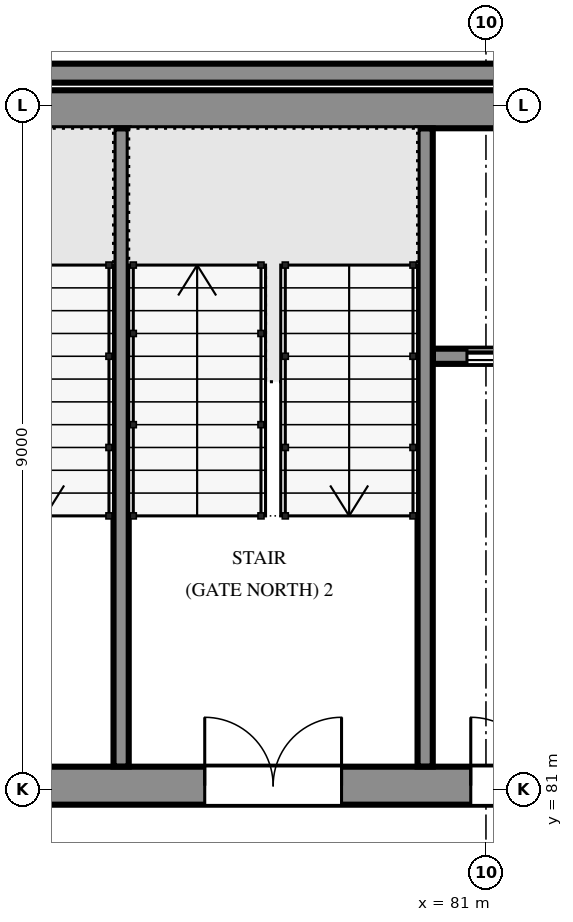
"""IFC4 building model, lengths in metres.
Left out: names, types, materials, properties, quantities, classifications, styles, units other than length and angle.
Written with IfcOpenShell. Run it as: python <this file> out.ifc"""

import sys

from ifc_helpers import new_model, si_unit, direction, frame, frame_2d, origin, place, context, subcontext, project, spatial, polyline, rectangle, outline, extrude, element, fill, save


model = new_model("IFC4")
c1 = context("Model", 3, precision=1e-05, world=origin(), true_north=direction((0.0, 1.0)))
c2 = subcontext(c1, "Body", "Model", "MODEL_VIEW")
j1 = project(units=[si_unit("LENGTHUNIT", "METRE"), si_unit("PLANEANGLEUNIT", "RADIAN")], contexts=[c1])
p1 = place(None, origin())
s1 = spatial("IfcSite", under=j1, at=p1, CompositionType="ELEMENT")
p2 = place(p1, origin())
s2 = spatial("IfcBuilding", under=s1, at=p2, CompositionType="ELEMENT")
p3 = place(p2, frame((0.0, 0.0, 11.7)))
s3 = spatial("IfcBuildingStorey", under=s2, at=p3, CompositionType="ELEMENT", Elevation=11.7)
p4 = place(p3, frame((71.8, 81.05, 0.0), z_axis=(0.0, 0.0, 1.0), x_axis=(1.0, 0.0, 0.0)))
e1 = element("IfcWall", 1, at=p4, inside=s3, PredefinedType="SOLIDWALL", context=c2, shape_type="SweptSolid", body=[
    extrude(rectangle(XDim=18.4, YDim=0.5, at=frame_2d((9.2, 0.0))), origin(), (0.0, 0.0, 1.0), 4.2),
])
p5 = place(p4, frame((1.5, 0.0, 0.0)))
e2 = element("IfcOpeningElement", 2, at=p5, cuts=e1, PredefinedType="OPENING", context=c2, shape_type="SweptSolid", body=[
    extrude(rectangle(XDim=1.8, YDim=2.1, at=frame_2d((0.9, 1.05))), frame((0.0, 0.26, 0.0), z_axis=(0.0, -1.0, 0.0), x_axis=(1.0, 0.0, 0.0)), (0.0, 0.0, 1.0), 0.52),
])
p6 = place(p4, frame((5.5, 0.0, 0.0)))
e3 = element("IfcOpeningElement", 3, at=p6, cuts=e1, PredefinedType="OPENING", context=c2, shape_type="SweptSolid", body=[
    extrude(rectangle(XDim=1.8, YDim=2.1, at=frame_2d((0.9, 1.05))), frame((0.0, 0.26, 0.0), z_axis=(0.0, -1.0, 0.0), x_axis=(1.0, 0.0, 0.0)), (0.0, 0.0, 1.0), 0.52),
])
p7 = place(p4, frame((9.0, 0.0, 0.0)))
e4 = element("IfcOpeningElement", 4, at=p7, cuts=e1, PredefinedType="OPENING", context=c2, shape_type="SweptSolid", body=[
    extrude(rectangle(XDim=1.8, YDim=2.1, at=frame_2d((0.9, 1.05))), frame((0.0, 0.26, 0.0), z_axis=(0.0, -1.0, 0.0), x_axis=(1.0, 0.0, 0.0)), (0.0, 0.0, 1.0), 0.52),
])
p8 = place(p4, frame((16.15, 0.0, 0.0)))
e5 = element("IfcOpeningElement", 5, at=p8, cuts=e1, PredefinedType="OPENING", context=c2, shape_type="SweptSolid", body=[
    extrude(rectangle(XDim=0.9, YDim=2.1, at=frame_2d((0.45, 1.05))), frame((0.0, 0.26, 0.0), z_axis=(0.0, -1.0, 0.0), x_axis=(1.0, 0.0, 0.0)), (0.0, 0.0, 1.0), 0.52),
])
p9 = place(p3, frame((71.8, 89.95, 0.0), z_axis=(0.0, 0.0, 1.0), x_axis=(1.0, 0.0, 0.0)))
e6 = element("IfcWall", 6, at=p9, inside=s3, PredefinedType="SOLIDWALL", context=c2, shape_type="SweptSolid", body=[
    extrude(rectangle(XDim=18.4, YDim=0.5, at=frame_2d((9.2, 0.0))), origin(), (0.0, 0.0, 1.0), 4.2),
])
p10 = place(p3, frame((71.45, 90.425, 0.0), z_axis=(0.0, 0.0, 1.0), x_axis=(1.0, 0.0, 0.0)))
e7 = element("IfcWall", 7, at=p10, inside=s3, PredefinedType="SOLIDWALL", context=c2, shape_type="SweptSolid", body=[
    extrude(outline(polyline([(0.0, 0.0), (19.1, 0.0), (19.1, 12.6), (0.0, 12.6), (0.0, 0.0)]), holes=[polyline([(1.308, 2.439), (1.352, 2.546), (1.408, 2.646), (1.475, 2.74), (1.552, 2.826), (1.638, 2.903), (1.732, 2.969), (1.833, 3.025), (1.939, 3.068), (2.05, 3.1), (2.161, 3.068), (2.267, 3.025), (2.368, 2.969), (2.462, 2.903), (2.549, 2.826), (2.625, 2.74), (2.692, 2.646), (2.748, 2.546), (2.792, 2.439), (2.824, 2.329), (2.844, 2.215), (2.85, 2.1), (2.85, 0.6), (1.25, 0.6), (1.25, 2.1), (1.257, 2.215), (1.276, 2.329), (1.308, 2.439)]), polyline([(4.308, 2.439), (4.352, 2.546), (4.408, 2.646), (4.475, 2.74), (4.552, 2.826), (4.638, 2.903), (4.732, 2.969), (4.833, 3.025), (4.939, 3.068), (5.05, 3.1), (5.161, 3.068), (5.267, 3.025), (5.368, 2.969), (5.462, 2.903), (5.549, 2.826), (5.625, 2.74), (5.692, 2.646), (5.748, 2.546), (5.792, 2.439), (5.824, 2.329), (5.844, 2.215), (5.85, 2.1), (5.85, 0.6), (4.25, 0.6), (4.25, 2.1), (4.257, 2.215), (4.276, 2.329), (4.308, 2.439)]), polyline([(7.308, 2.439), (7.352, 2.546), (7.408, 2.646), (7.475, 2.74), (7.552, 2.826), (7.638, 2.903), (7.732, 2.969), (7.833, 3.025), (7.939, 3.068), (8.05, 3.1), (8.161, 3.068), (8.267, 3.025), (8.368, 2.969), (8.462, 2.903), (8.549, 2.826), (8.625, 2.74), (8.692, 2.646), (8.748, 2.546), (8.792, 2.439), (8.824, 2.329), (8.844, 2.215), (8.85, 2.1), (8.85, 0.6), (7.25, 0.6), (7.25, 2.1), (7.257, 2.215), (7.276, 2.329), (7.308, 2.439)]), polyline([(1.308, 6.639), (1.352, 6.746), (1.408, 6.846), (1.475, 6.94), (1.552, 7.026), (1.638, 7.103), (1.732, 7.169), (1.833, 7.225), (1.939, 7.269), (2.05, 7.3), (2.161, 7.269), (2.267, 7.225), (2.368, 7.169), (2.462, 7.103), (2.549, 7.026), (2.625, 6.94), (2.692, 6.846), (2.748, 6.746), (2.792, 6.639), (2.824, 6.529), (2.844, 6.415), (2.85, 6.3), (2.85, 4.8), (1.25, 4.8), (1.25, 6.3), (1.257, 6.415), (1.276, 6.529), (1.308, 6.639)]), polyline([(4.308, 6.639), (4.352, 6.746), (4.408, 6.846), (4.475, 6.94), (4.552, 7.026), (4.638, 7.103), (4.732, 7.169), (4.833, 7.225), (4.939, 7.269), (5.05, 7.3), (5.161, 7.269), (5.267, 7.225), (5.368, 7.169), (5.462, 7.103), (5.549, 7.026), (5.625, 6.94), (5.692, 6.846), (5.748, 6.746), (5.792, 6.639), (5.824, 6.529), (5.844, 6.415), (5.85, 6.3), (5.85, 4.8), (4.25, 4.8), (4.25, 6.3), (4.257, 6.415), (4.276, 6.529), (4.308, 6.639)]), polyline([(7.308, 6.639), (7.352, 6.746), (7.408, 6.846), (7.475, 6.94), (7.552, 7.026), (7.638, 7.103), (7.732, 7.169), (7.833, 7.225), (7.939, 7.269), (8.05, 7.3), (8.161, 7.269), (8.267, 7.225), (8.368, 7.169), (8.462, 7.103), (8.549, 7.026), (8.625, 6.94), (8.692, 6.846), (8.748, 6.746), (8.792, 6.639), (8.824, 6.529), (8.844, 6.415), (8.85, 6.3), (8.85, 4.8), (7.25, 4.8), (7.25, 6.3), (7.257, 6.415), (7.276, 6.529), (7.308, 6.639)]), polyline([(1.308, 10.839), (1.352, 10.946), (1.408, 11.046), (1.475, 11.14), (1.552, 11.226), (1.638, 11.303), (1.732, 11.369), (1.833, 11.425), (1.939, 11.469), (2.05, 11.5), (2.161, 11.469), (2.267, 11.425), (2.368, 11.369), (2.462, 11.303), (2.549, 11.226), (2.625, 11.14), (2.692, 11.046), (2.748, 10.946), (2.792, 10.839), (2.824, 10.729), (2.844, 10.615), (2.85, 10.5), (2.85, 9.0), (1.25, 9.0), (1.25, 10.5), (1.257, 10.615), (1.276, 10.729), (1.308, 10.839)]), polyline([(4.352, 10.946), (4.408, 11.046), (4.475, 11.14), (4.552, 11.226), (4.638, 11.303), (4.732, 11.369), (4.833, 11.425), (4.939, 11.469), (5.05, 11.5), (5.161, 11.469), (5.267, 11.425), (5.368, 11.369), (5.462, 11.303), (5.549, 11.226), (5.625, 11.14), (5.692, 11.046), (5.748, 10.946), (5.792, 10.839), (5.824, 10.729), (5.844, 10.615), (5.85, 10.5), (5.85, 9.0), (4.25, 9.0), (4.25, 10.5), (4.257, 10.615), (4.276, 10.729), (4.308, 10.839), (4.352, 10.946)]), polyline([(7.352, 10.946), (7.408, 11.046), (7.475, 11.14), (7.552, 11.226), (7.638, 11.303), (7.732, 11.369), (7.833, 11.425), (7.939, 11.469), (8.05, 11.5), (8.161, 11.469), (8.267, 11.425), (8.368, 11.369), (8.462, 11.303), (8.549, 11.226), (8.625, 11.14), (8.692, 11.046), (8.748, 10.946), (8.792, 10.839), (8.824, 10.729), (8.844, 10.615), (8.85, 10.5), (8.85, 9.0), (7.25, 9.0), (7.25, 10.5), (7.257, 10.615), (7.276, 10.729), (7.308, 10.839), (7.352, 10.946)]), polyline([(10.308, 2.439), (10.352, 2.546), (10.408, 2.646), (10.475, 2.74), (10.552, 2.826), (10.638, 2.903), (10.732, 2.969), (10.833, 3.025), (10.939, 3.068), (11.05, 3.1), (11.161, 3.068), (11.267, 3.025), (11.368, 2.969), (11.462, 2.903), (11.549, 2.826), (11.625, 2.74), (11.692, 2.646), (11.748, 2.546), (11.792, 2.439), (11.824, 2.329), (11.844, 2.215), (11.85, 2.1), (11.85, 0.6), (10.25, 0.6), (10.25, 2.1), (10.257, 2.215), (10.276, 2.329), (10.308, 2.439)]), polyline([(13.308, 2.439), (13.352, 2.546), (13.408, 2.646), (13.475, 2.74), (13.552, 2.826), (13.638, 2.903), (13.732, 2.969), (13.833, 3.025), (13.939, 3.068), (14.05, 3.1), (14.161, 3.068), (14.267, 3.025), (14.368, 2.969), (14.462, 2.903), (14.549, 2.826), (14.625, 2.74), (14.692, 2.646), (14.748, 2.546), (14.792, 2.439), (14.824, 2.329), (14.844, 2.215), (14.85, 2.1), (14.85, 0.6), (13.25, 0.6), (13.25, 2.1), (13.257, 2.215), (13.276, 2.329), (13.308, 2.439)]), polyline([(16.308, 2.439), (16.352, 2.546), (16.408, 2.646), (16.475, 2.74), (16.552, 2.826), (16.638, 2.903), (16.732, 2.969), (16.833, 3.025), (16.939, 3.068), (17.05, 3.1), (17.161, 3.068), (17.267, 3.025), (17.368, 2.969), (17.462, 2.903), (17.549, 2.826), (17.625, 2.74), (17.692, 2.646), (17.748, 2.546), (17.792, 2.439), (17.824, 2.329), (17.844, 2.215), (17.85, 2.1), (17.85, 0.6), (16.25, 0.6), (16.25, 2.1), (16.257, 2.215), (16.276, 2.329), (16.308, 2.439)]), polyline([(10.308, 6.639), (10.352, 6.746), (10.408, 6.846), (10.475, 6.94), (10.552, 7.026), (10.638, 7.103), (10.732, 7.169), (10.833, 7.225), (10.939, 7.269), (11.05, 7.3), (11.161, 7.269), (11.267, 7.225), (11.368, 7.169), (11.462, 7.103), (11.549, 7.026), (11.625, 6.94), (11.692, 6.846), (11.748, 6.746), (11.792, 6.639), (11.824, 6.529), (11.844, 6.415), (11.85, 6.3), (11.85, 4.8), (10.25, 4.8), (10.25, 6.3), (10.257, 6.415), (10.276, 6.529), (10.308, 6.639)]), polyline([(13.308, 6.639), (13.352, 6.746), (13.408, 6.846), (13.475, 6.94), (13.552, 7.026), (13.638, 7.103), (13.732, 7.169), (13.833, 7.225), (13.939, 7.269), (14.05, 7.3), (14.161, 7.269), (14.267, 7.225), (14.368, 7.169), (14.462, 7.103), (14.549, 7.026), (14.625, 6.94), (14.692, 6.846), (14.748, 6.746), (14.792, 6.639), (14.824, 6.529), (14.844, 6.415), (14.85, 6.3), (14.85, 4.8), (13.25, 4.8), (13.25, 6.3), (13.257, 6.415), (13.276, 6.529), (13.308, 6.639)]), polyline([(16.308, 6.639), (16.352, 6.746), (16.408, 6.846), (16.475, 6.94), (16.552, 7.026), (16.638, 7.103), (16.732, 7.169), (16.833, 7.225), (16.939, 7.269), (17.05, 7.3), (17.161, 7.269), (17.267, 7.225), (17.368, 7.169), (17.462, 7.103), (17.549, 7.026), (17.625, 6.94), (17.692, 6.846), (17.748, 6.746), (17.792, 6.639), (17.824, 6.529), (17.844, 6.415), (17.85, 6.3), (17.85, 4.8), (16.25, 4.8), (16.25, 6.3), (16.257, 6.415), (16.276, 6.529), (16.308, 6.639)]), polyline([(10.308, 10.839), (10.352, 10.946), (10.408, 11.046), (10.475, 11.14), (10.552, 11.226), (10.638, 11.303), (10.732, 11.369), (10.833, 11.425), (10.939, 11.469), (11.05, 11.5), (11.161, 11.469), (11.267, 11.425), (11.368, 11.369), (11.462, 11.303), (11.549, 11.226), (11.625, 11.14), (11.692, 11.046), (11.748, 10.946), (11.792, 10.839), (11.824, 10.729), (11.844, 10.615), (11.85, 10.5), (11.85, 9.0), (10.25, 9.0), (10.25, 10.5), (10.257, 10.615), (10.276, 10.729), (10.308, 10.839)]), polyline([(13.352, 10.946), (13.408, 11.046), (13.475, 11.14), (13.552, 11.226), (13.638, 11.303), (13.732, 11.369), (13.833, 11.425), (13.939, 11.469), (14.05, 11.5), (14.161, 11.469), (14.267, 11.425), (14.368, 11.369), (14.462, 11.303), (14.549, 11.226), (14.625, 11.14), (14.692, 11.046), (14.748, 10.946), (14.792, 10.839), (14.824, 10.729), (14.844, 10.615), (14.85, 10.5), (14.85, 9.0), (13.25, 9.0), (13.25, 10.5), (13.257, 10.615), (13.276, 10.729), (13.308, 10.839), (13.352, 10.946)]), polyline([(16.352, 10.946), (16.408, 11.046), (16.475, 11.14), (16.552, 11.226), (16.638, 11.303), (16.732, 11.369), (16.833, 11.425), (16.939, 11.469), (17.05, 11.5), (17.161, 11.469), (17.267, 11.425), (17.368, 11.369), (17.462, 11.303), (17.549, 11.226), (17.625, 11.14), (17.692, 11.046), (17.748, 10.946), (17.792, 10.839), (17.824, 10.729), (17.844, 10.615), (17.85, 10.5), (17.85, 9.0), (16.25, 9.0), (16.25, 10.5), (16.257, 10.615), (16.276, 10.729), (16.308, 10.839), (16.352, 10.946)])]), frame((0.0, 0.125, 0.0), z_axis=(0.0, -1.0, 0.0), x_axis=(1.0, 0.0, 0.0)), (0.0, 0.0, 1.0), 0.25),
])
for number, where, z_axis, x_axis in (
    (8, (76.2, 81.302, -0.15), (0.0, 0.0, 1.0), (0.0, 1.0, 0.0)),
    (9, (80.2, 81.302, -0.15), (0.0, 0.0, 1.0), (0.0, 1.0, 0.0)),
):
    element("IfcWall", number, at=place(p3, frame(where, z_axis=z_axis, x_axis=x_axis)), inside=s3, PredefinedType="SOLIDWALL", context=c2, shape_type="SweptSolid", body=[
        extrude(rectangle(XDim=8.396, YDim=0.2, at=frame_2d((4.198, 0.0))), origin(), (0.0, 0.0, 1.0), 3.666),
    ])
p11 = place(p3, frame((80.302, 86.7, 0.0), z_axis=(0.0, 0.0, 1.0), x_axis=(1.0, 0.0, 0.0)))
e10 = element("IfcWall", 10, at=p11, inside=s3, PredefinedType="SOLIDWALL", context=c2, shape_type="SweptSolid", body=[
    extrude(rectangle(XDim=2.198, YDim=0.2, at=frame_2d((1.099, 0.0))), origin(), (0.0, 0.0, 1.0), 3.516),
])
p12 = place(p11, frame((0.448, 0.0, 0.0)))
e11 = element("IfcOpeningElement", 11, at=p12, cuts=e10, PredefinedType="OPENING", context=c2, shape_type="SweptSolid", body=[
    extrude(rectangle(XDim=1.1, YDim=2.1, at=frame_2d((0.55, 1.05))), frame((0.0, 0.11, 0.0), z_axis=(0.0, -1.0, 0.0), x_axis=(1.0, 0.0, 0.0)), (0.0, 0.0, 1.0), 0.22),
])
p13 = place(p12, origin())
e12 = element("IfcDoor", 12, at=p13, inside=s3, OperationType="SLIDING_TO_LEFT", PredefinedType="DOOR", context=c2, shape_type="SweptSolid", body=[
    extrude(outline(polyline([(0.0, 0.0), (0.07, 0.0), (0.07, 2.03), (1.03, 2.03), (1.03, 0.0), (1.1, 0.0), (1.1, 2.1), (0.0, 2.1), (0.0, 0.0)])), frame((0.0, 0.025, 0.0), z_axis=(0.0, -1.0, 0.0), x_axis=(1.0, 0.0, 0.0)), (0.0, 0.0, 1.0), 0.05),
    extrude(rectangle(XDim=0.524, YDim=2.016, at=frame_2d((0.336, 1.018))), frame((0.0, 0.018, 0.0), z_axis=(0.0, -1.0, 0.0), x_axis=(1.0, 0.0, 0.0)), (0.0, 0.0, 1.0), 0.016),
    extrude(rectangle(XDim=0.52, YDim=2.016, at=frame_2d((0.766, 1.018))), frame((0.0, -0.002, 0.0), z_axis=(0.0, -1.0, 0.0), x_axis=(1.0, 0.0, 0.0)), (0.0, 0.0, 1.0), 0.016),
])
fill(e11, e12)
p14 = place(p6, origin())
e13 = element("IfcDoor", 13, at=p14, inside=s3, OperationType="DOUBLE_DOOR_SINGLE_SWING", PredefinedType="DOOR", context=c2, shape_type="SweptSolid", body=[
    extrude(outline(polyline([(0.0, 0.0), (0.07, 0.0), (0.07, 2.03), (1.73, 2.03), (1.73, 0.0), (1.8, 0.0), (1.8, 2.1), (0.0, 2.1), (0.0, 0.0)])), frame((0.0, 0.025, 0.0), z_axis=(0.0, -1.0, 0.0), x_axis=(1.0, 0.0, 0.0)), (0.0, 0.0, 1.0), 0.05),
    extrude(outline(polyline([(0.074, 0.01), (0.897, 0.01), (0.897, 2.026), (0.074, 2.026), (0.074, 0.01)]), holes=[polyline([(0.194, 0.16), (0.777, 0.16), (0.777, 1.01), (0.194, 1.01), (0.194, 0.16)]), polyline([(0.335, 1.16), (0.635, 1.16), (0.635, 1.76), (0.335, 1.76), (0.335, 1.16)])]), frame((0.0, 0.017, 0.0), z_axis=(0.0, -1.0, 0.0), x_axis=(1.0, 0.0, 0.0)), (0.0, 0.0, 1.0), 0.035),
    extrude(rectangle(XDim=0.583, YDim=0.85, at=frame_2d((0.485, 0.585))), frame((0.0, 0.009, 0.0), z_axis=(0.0, -1.0, 0.0), x_axis=(1.0, 0.0, 0.0)), (0.0, 0.0, 1.0), 0.017),
    extrude(rectangle(XDim=0.3, YDim=0.6, at=frame_2d((0.485, 1.46))), frame((0.0, 0.006, 0.0), z_axis=(0.0, -1.0, 0.0), x_axis=(1.0, 0.0, 0.0)), (0.0, 0.0, 1.0), 0.012),
    extrude(outline(polyline([(0.903, 0.01), (1.726, 0.01), (1.726, 2.026), (0.903, 2.026), (0.903, 0.01)]), holes=[polyline([(1.023, 0.16), (1.606, 0.16), (1.606, 1.01), (1.023, 1.01), (1.023, 0.16)]), polyline([(1.165, 1.16), (1.465, 1.16), (1.465, 1.76), (1.165, 1.76), (1.165, 1.16)])]), frame((0.0, 0.017, 0.0), z_axis=(0.0, -1.0, 0.0), x_axis=(1.0, 0.0, 0.0)), (0.0, 0.0, 1.0), 0.035),
    extrude(rectangle(XDim=0.583, YDim=0.85, at=frame_2d((1.314, 0.585))), frame((0.0, 0.009, 0.0), z_axis=(0.0, -1.0, 0.0), x_axis=(1.0, 0.0, 0.0)), (0.0, 0.0, 1.0), 0.017),
    extrude(rectangle(XDim=0.3, YDim=0.6, at=frame_2d((1.314, 1.46))), frame((0.0, 0.006, 0.0), z_axis=(0.0, -1.0, 0.0), x_axis=(1.0, 0.0, 0.0)), (0.0, 0.0, 1.0), 0.012),
])
fill(e3, e13)
p15 = place(p7, origin())
e14 = element("IfcDoor", 14, at=p15, inside=s3, OperationType="DOUBLE_DOOR_SINGLE_SWING", PredefinedType="DOOR", context=c2, shape_type="SweptSolid", body=[
    extrude(outline(polyline([(0.0, 0.0), (0.07, 0.0), (0.07, 2.03), (1.73, 2.03), (1.73, 0.0), (1.8, 0.0), (1.8, 2.1), (0.0, 2.1), (0.0, 0.0)])), frame((0.0, 0.025, 0.0), z_axis=(0.0, -1.0, 0.0), x_axis=(1.0, 0.0, 0.0)), (0.0, 0.0, 1.0), 0.05),
    extrude(outline(polyline([(0.074, 0.01), (0.897, 0.01), (0.897, 2.026), (0.074, 2.026), (0.074, 0.01)]), holes=[polyline([(0.194, 0.16), (0.777, 0.16), (0.777, 1.01), (0.194, 1.01), (0.194, 0.16)]), polyline([(0.335, 1.16), (0.635, 1.16), (0.635, 1.76), (0.335, 1.76), (0.335, 1.16)])]), frame((0.0, 0.017, 0.0), z_axis=(0.0, -1.0, 0.0), x_axis=(1.0, 0.0, 0.0)), (0.0, 0.0, 1.0), 0.035),
    extrude(rectangle(XDim=0.583, YDim=0.85, at=frame_2d((0.485, 0.585))), frame((0.0, 0.009, 0.0), z_axis=(0.0, -1.0, 0.0), x_axis=(1.0, 0.0, 0.0)), (0.0, 0.0, 1.0), 0.017),
    extrude(rectangle(XDim=0.3, YDim=0.6, at=frame_2d((0.485, 1.46))), frame((0.0, 0.006, 0.0), z_axis=(0.0, -1.0, 0.0), x_axis=(1.0, 0.0, 0.0)), (0.0, 0.0, 1.0), 0.012),
    extrude(outline(polyline([(0.903, 0.01), (1.726, 0.01), (1.726, 2.026), (0.903, 2.026), (0.903, 0.01)]), holes=[polyline([(1.023, 0.16), (1.606, 0.16), (1.606, 1.01), (1.023, 1.01), (1.023, 0.16)]), polyline([(1.165, 1.16), (1.465, 1.16), (1.465, 1.76), (1.165, 1.76), (1.165, 1.16)])]), frame((0.0, 0.017, 0.0), z_axis=(0.0, -1.0, 0.0), x_axis=(1.0, 0.0, 0.0)), (0.0, 0.0, 1.0), 0.035),
    extrude(rectangle(XDim=0.583, YDim=0.85, at=frame_2d((1.314, 0.585))), frame((0.0, 0.009, 0.0), z_axis=(0.0, -1.0, 0.0), x_axis=(1.0, 0.0, 0.0)), (0.0, 0.0, 1.0), 0.017),
    extrude(rectangle(XDim=0.3, YDim=0.6, at=frame_2d((1.314, 1.46))), frame((0.0, 0.006, 0.0), z_axis=(0.0, -1.0, 0.0), x_axis=(1.0, 0.0, 0.0)), (0.0, 0.0, 1.0), 0.012),
])
fill(e4, e14)
save(model, sys.argv[1])
